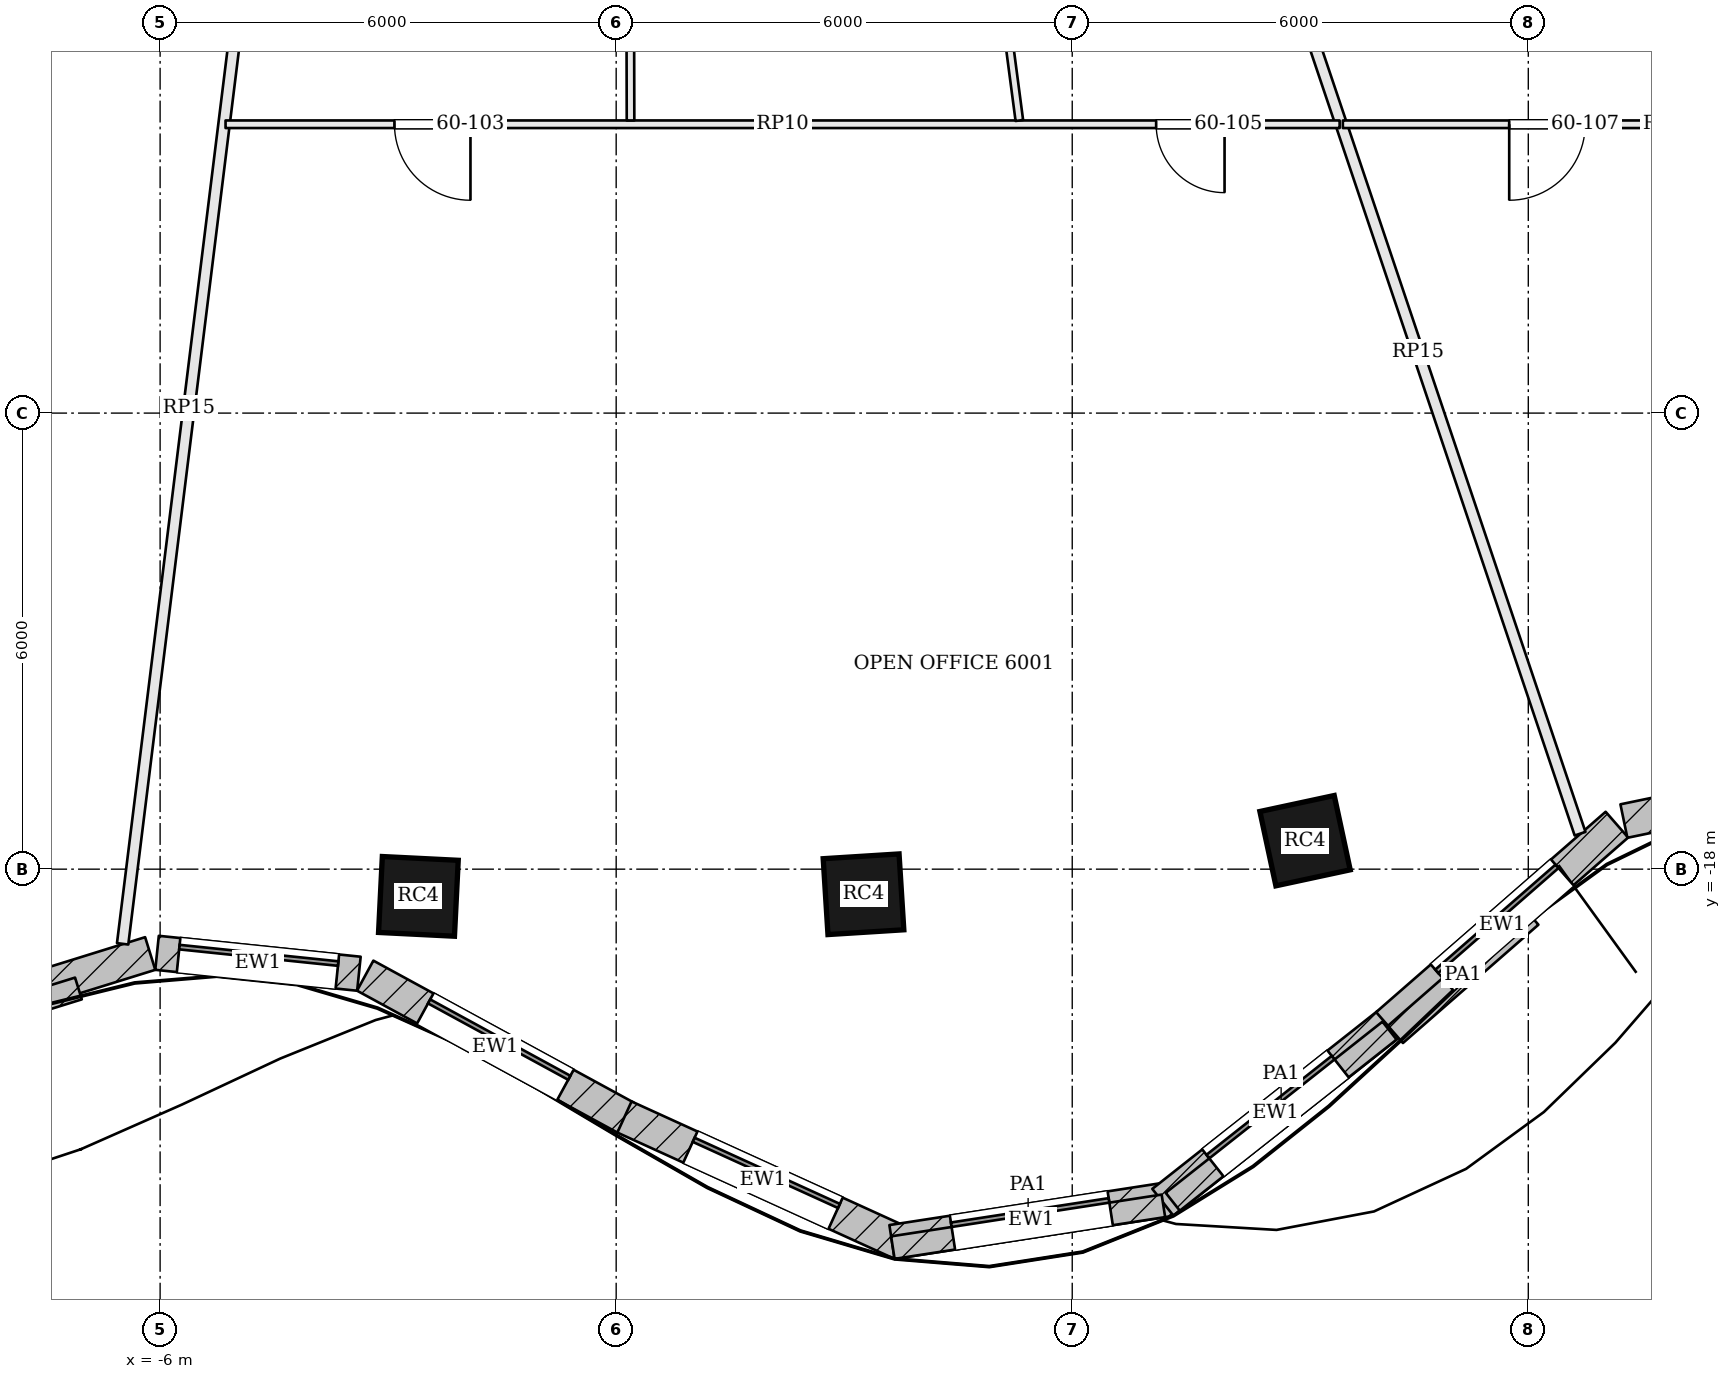
"""IFC4 building model, lengths in metres.
Left out: names, types, materials, properties, quantities, classifications, styles, units other than length and angle.
Written with IfcOpenShell. Run it as: python <this file> out.ifc"""

import sys

from ifc_helpers import new_model, si_unit, direction, frame, frame_2d, origin, origin_2d, place, context, subcontext, project, spatial, rectangle, extrude, element, fill, save


model = new_model("IFC4")
c1 = context("Model", 3, precision=1e-05, world=origin(), true_north=direction((0.0, 1.0)))
c2 = subcontext(c1, "Body", "Model", "MODEL_VIEW")
j1 = project(units=[si_unit("LENGTHUNIT", "METRE"), si_unit("PLANEANGLEUNIT", "RADIAN")], contexts=[c1])
p1 = place(None, origin())
s1 = spatial("IfcSite", under=j1, at=p1, CompositionType="ELEMENT")
p2 = place(p1, origin())
s2 = spatial("IfcBuilding", under=s1, at=p2, CompositionType="ELEMENT")
p3 = place(p2, frame((0.0, 0.0, 244.8)))
s3 = spatial("IfcBuildingStorey", under=s2, at=p3, CompositionType="ELEMENT", Elevation=244.8)
for number, where, z_axis, x_axis in (
    (1, (-2.602, -18.358, 0.0), (0.0, 0.0, 1.0), (0.999, -0.05, 0.0)),
    (2, (3.254, -18.33, 0.0), (0.0, 0.0, 1.0), (0.998, 0.063, 0.0)),
    (3, (9.063, -17.625, 0.0), (0.0, 0.0, 1.0), (0.978, 0.21, 0.0)),
):
    element("IfcColumn", number, at=place(p3, frame(where, z_axis=z_axis, x_axis=x_axis)), inside=s3, PredefinedType="COLUMN", context=c2, shape_type="SweptSolid", body=[
        extrude(rectangle(XDim=1.0, YDim=1.0, at=origin_2d()), origin(), (0.0, 0.0, 1.0), 3.9),
    ])
p4 = place(p3, frame((-11.007, -20.625, 0.0), z_axis=(0.0, 0.0, 1.0), x_axis=(0.954949254112, 0.296769139352, 0.0)))
e4 = element("IfcWall", 4, at=p4, inside=s3, PredefinedType="SOLIDWALL", context=c2, shape_type="SweptSolid", body=[
    extrude(rectangle(XDim=5.106, YDim=0.45, at=frame_2d((2.553, 0.0))), origin(), (0.0, 0.0, 1.0), 3.7),
])
p5 = place(p4, frame((1.503, 0.0, 0.9)))
e5 = element("IfcOpeningElement", 5, at=p5, cuts=e4, PredefinedType="OPENING", context=c2, shape_type="SweptSolid", body=[
    extrude(rectangle(XDim=2.1, YDim=2.3, at=frame_2d((1.05, 1.15))), frame((0.0, 0.235, 0.0), z_axis=(0.0, -1.0, 0.0), x_axis=(1.0, 0.0, 0.0)), (0.0, 0.0, 1.0), 0.47),
])
p6 = place(p3, frame((-6.04, -19.101, 0.0), z_axis=(0.0, 0.0, 1.0), x_axis=(0.994675968472, -0.103052014752, 0.0)))
e6 = element("IfcWall", 6, at=p6, inside=s3, PredefinedType="SOLIDWALL", context=c2, shape_type="SweptSolid", body=[
    extrude(rectangle(XDim=2.67, YDim=0.45, at=frame_2d((1.335, 0.0))), origin(), (0.0, 0.0, 1.0), 3.7),
])
p7 = place(p6, frame((0.285, 0.0, 0.9)))
e7 = element("IfcOpeningElement", 7, at=p7, cuts=e6, PredefinedType="OPENING", context=c2, shape_type="SweptSolid", body=[
    extrude(rectangle(XDim=2.1, YDim=2.3, at=frame_2d((1.05, 1.15))), frame((0.0, 0.235, 0.0), z_axis=(0.0, -1.0, 0.0), x_axis=(1.0, 0.0, 0.0)), (0.0, 0.0, 1.0), 0.47),
])
p8 = place(p3, frame((-3.302, -19.401, 0.0), z_axis=(0.0, 0.0, 1.0), x_axis=(0.878060540763, -0.47854956562, 0.0)))
e8 = element("IfcWall", 8, at=p8, inside=s3, PredefinedType="SOLIDWALL", context=c2, shape_type="SweptSolid", body=[
    extrude(rectangle(XDim=3.901, YDim=0.45, at=frame_2d((1.951, 0.0))), origin(), (0.0, 0.0, 1.0), 3.7),
])
p9 = place(p8, frame((0.901, 0.0, 0.9)))
e9 = element("IfcOpeningElement", 9, at=p9, cuts=e8, PredefinedType="OPENING", context=c2, shape_type="SweptSolid", body=[
    extrude(rectangle(XDim=2.1, YDim=2.3, at=frame_2d((1.05, 1.15))), frame((0.0, 0.235, 0.0), z_axis=(0.0, -1.0, 0.0), x_axis=(1.0, 0.0, 0.0)), (0.0, 0.0, 1.0), 0.47),
])
p10 = place(p3, frame((0.109, -21.261, 0.0), z_axis=(0.0, 0.0, 1.0), x_axis=(0.910040573706, -0.414519184367, 0.0)))
e10 = element("IfcWall", 10, at=p10, inside=s3, PredefinedType="SOLIDWALL", context=c2, shape_type="SweptSolid", body=[
    extrude(rectangle(XDim=4.006, YDim=0.45, at=frame_2d((2.003, 0.0))), origin(), (0.0, 0.0, 1.0), 3.7),
])
p11 = place(p10, frame((0.953, 0.0, 0.9)))
e11 = element("IfcOpeningElement", 11, at=p11, cuts=e10, PredefinedType="OPENING", context=c2, shape_type="SweptSolid", body=[
    extrude(rectangle(XDim=2.1, YDim=2.3, at=frame_2d((1.05, 1.15))), frame((0.0, 0.235, 0.0), z_axis=(0.0, -1.0, 0.0), x_axis=(1.0, 0.0, 0.0)), (0.0, 0.0, 1.0), 0.47),
])
p12 = place(p3, frame((3.629, -22.905, 0.0), z_axis=(0.0, 0.0, 1.0), x_axis=(0.988300084321, 0.152521943772, 0.0)))
e12 = element("IfcWall", 12, at=p12, inside=s3, PredefinedType="SOLIDWALL", context=c2, shape_type="SweptSolid", body=[
    extrude(rectangle(XDim=3.71, YDim=0.45, at=frame_2d((1.855, 0.0))), origin(), (0.0, 0.0, 1.0), 3.7),
])
p13 = place(p12, frame((0.805, 0.0, 0.9)))
e13 = element("IfcOpeningElement", 13, at=p13, cuts=e12, PredefinedType="OPENING", context=c2, shape_type="SweptSolid", body=[
    extrude(rectangle(XDim=2.1, YDim=2.3, at=frame_2d((1.05, 1.15))), frame((0.0, 0.235, 0.0), z_axis=(0.0, -1.0, 0.0), x_axis=(1.0, 0.0, 0.0)), (0.0, 0.0, 1.0), 0.47),
])
p14 = place(p3, frame((7.193, -22.383, 0.0), z_axis=(0.0, 0.0, 1.0), x_axis=(0.784803291184, 0.619744942816, 0.0)))
e14 = element("IfcWall", 14, at=p14, inside=s3, PredefinedType="SOLIDWALL", context=c2, shape_type="SweptSolid", body=[
    extrude(rectangle(XDim=3.775, YDim=0.45, at=frame_2d((1.887, 0.0))), origin(), (0.0, 0.0, 1.0), 3.7),
])
p15 = place(p14, frame((0.837, 0.0, 0.9)))
e15 = element("IfcOpeningElement", 15, at=p15, cuts=e14, PredefinedType="OPENING", context=c2, shape_type="SweptSolid", body=[
    extrude(rectangle(XDim=2.1, YDim=2.3, at=frame_2d((1.05, 1.15))), frame((0.0, 0.235, 0.0), z_axis=(0.0, -1.0, 0.0), x_axis=(1.0, 0.0, 0.0)), (0.0, 0.0, 1.0), 0.47),
])
p16 = place(p3, frame((10.146, -20.051, 0.0), z_axis=(0.0, 0.0, 1.0), x_axis=(0.753278140428, 0.657702093013, 0.0)))
e16 = element("IfcWall", 16, at=p16, inside=s3, PredefinedType="SOLIDWALL", context=c2, shape_type="SweptSolid", body=[
    extrude(rectangle(XDim=4.008, YDim=0.45, at=frame_2d((2.004, 0.0))), origin(), (0.0, 0.0, 1.0), 3.7),
])
p17 = place(p16, frame((0.954, 0.0, 0.9)))
e17 = element("IfcOpeningElement", 17, at=p17, cuts=e16, PredefinedType="OPENING", context=c2, shape_type="SweptSolid", body=[
    extrude(rectangle(XDim=2.1, YDim=2.3, at=frame_2d((1.05, 1.15))), frame((0.0, 0.235, 0.0), z_axis=(0.0, -1.0, 0.0), x_axis=(1.0, 0.0, 0.0)), (0.0, 0.0, 1.0), 0.47),
])
p18 = place(p3, frame((13.258, -17.367, 0.0), z_axis=(0.0, 0.0, 1.0), x_axis=(0.97914968674, 0.203140077183, 0.0)))
e18 = element("IfcWall", 18, at=p18, inside=s3, PredefinedType="SOLIDWALL", context=c2, shape_type="SweptSolid", body=[
    extrude(rectangle(XDim=3.7, YDim=0.45, at=frame_2d((1.85, 0.0))), origin(), (0.0, 0.0, 1.0), 3.7),
])
p19 = place(p18, frame((0.8, 0.0, 0.9)))
e19 = element("IfcOpeningElement", 19, at=p19, cuts=e18, PredefinedType="OPENING", context=c2, shape_type="SweptSolid", body=[
    extrude(rectangle(XDim=2.1, YDim=2.3, at=frame_2d((1.05, 1.15))), frame((0.0, 0.235, 0.0), z_axis=(0.0, -1.0, 0.0), x_axis=(1.0, 0.0, 0.0)), (0.0, 0.0, 1.0), 0.47),
])
p20 = place(p3, frame((-10.59, -20.662, 3.9), z_axis=(0.0, 0.0, 1.0), x_axis=(0.954933257017, 0.296820610207, 0.0)))
e20 = element("IfcWall", 20, at=p20, inside=s3, PredefinedType="PARAPET", context=c2, shape_type="SweptSolid", body=[
    extrude(rectangle(XDim=3.681, YDim=0.3, at=frame_2d((1.84, 0.0))), origin(), (0.0, 0.0, 1.0), 1.1),
])
p21 = place(p3, frame((3.64, -22.979, 3.9), z_axis=(0.0, 0.0, 1.0), x_axis=(0.988299486994, 0.152525814235, 0.0)))
e21 = element("IfcWall", 21, at=p21, inside=s3, PredefinedType="PARAPET", context=c2, shape_type="SweptSolid", body=[
    extrude(rectangle(XDim=3.602, YDim=0.3, at=frame_2d((1.801, 0.0))), origin(), (0.0, 0.0, 1.0), 1.1),
])
p22 = place(p3, frame((7.323, -22.376, 3.9), z_axis=(0.0, 0.0, 1.0), x_axis=(0.784819122577, 0.61972489448, 0.0)))
e22 = element("IfcWall", 22, at=p22, inside=s3, PredefinedType="PARAPET", context=c2, shape_type="SweptSolid", body=[
    extrude(rectangle(XDim=3.633, YDim=0.3, at=frame_2d((1.817, 0.0))), origin(), (0.0, 0.0, 1.0), 1.1),
])
p23 = place(p3, frame((10.252, -20.174, 3.9), z_axis=(0.0, 0.0, 1.0), x_axis=(0.753260147018, 0.657722700622, 0.0)))
e23 = element("IfcWall", 23, at=p23, inside=s3, PredefinedType="PARAPET", context=c2, shape_type="SweptSolid", body=[
    extrude(rectangle(XDim=2.366, YDim=0.3, at=frame_2d((1.183, 0.0))), origin(), (0.0, 0.0, 1.0), 1.1),
])
p24 = place(p3, frame((-6.493, -18.982, 0.0), z_axis=(0.0, 0.0, 1.0), x_axis=(0.122779061943, 0.992434029016, 0.0)))
e24 = element("IfcWall", 24, at=p24, inside=s3, PredefinedType="PARTITIONING", context=c2, shape_type="SweptSolid", body=[
    extrude(rectangle(XDim=14.216, YDim=0.15, at=frame_2d((7.108, 0.0))), origin(), (0.0, 0.0, 1.0), 3.084),
])
p25 = place(p3, frame((12.681, -17.533, 0.0), z_axis=(0.0, 0.0, 1.0), x_axis=(-0.319049570706, 0.947738028905, 0.0)))
e25 = element("IfcWall", 25, at=p25, inside=s3, PredefinedType="PARTITIONING", context=c2, shape_type="SweptSolid", body=[
    extrude(rectangle(XDim=13.361, YDim=0.15, at=frame_2d((6.68, 0.0))), origin(), (0.0, 0.0, 1.0), 3.084),
])
p26 = place(p3, frame((9.518, -8.2, 0.0), z_axis=(0.0, 0.0, 1.0), x_axis=(-1.0, 0.0, 0.0)))
e26 = element("IfcWall", 26, at=p26, inside=s3, PredefinedType="PARTITIONING", context=c2, shape_type="SweptSolid", body=[
    extrude(rectangle(XDim=14.657, YDim=0.1, at=frame_2d((7.329, 0.0))), origin(), (0.0, 0.0, 1.0), 3.084),
])
p27 = place(p26, frame((11.435, 0.0, 0.0)))
e27 = element("IfcOpeningElement", 27, at=p27, cuts=e26, PredefinedType="OPENING", context=c2, shape_type="SweptSolid", body=[
    extrude(rectangle(XDim=1.0, YDim=2.1, at=frame_2d((0.5, 1.05))), frame((0.0, 0.06, 0.0), z_axis=(0.0, -1.0, 0.0), x_axis=(1.0, 0.0, 0.0)), (0.0, 0.0, 1.0), 0.12),
])
p28 = place(p26, frame((1.514, 0.0, 0.0)))
e28 = element("IfcOpeningElement", 28, at=p28, cuts=e26, PredefinedType="OPENING", context=c2, shape_type="SweptSolid", body=[
    extrude(rectangle(XDim=0.9, YDim=2.1, at=frame_2d((0.45, 1.05))), frame((0.0, 0.06, 0.0), z_axis=(0.0, -1.0, 0.0), x_axis=(1.0, 0.0, 0.0)), (0.0, 0.0, 1.0), 0.12),
])
p29 = place(p3, frame((0.181, -4.875, 0.0), z_axis=(0.0, 0.0, 1.0), x_axis=(0.002311012168, -0.999997329608, 0.0)))
e29 = element("IfcWall", 29, at=p29, inside=s3, PredefinedType="PARTITIONING", context=c2, shape_type="SweptSolid", body=[
    extrude(rectangle(XDim=3.275, YDim=0.1, at=frame_2d((1.637, 0.0))), origin(), (0.0, 0.0, 1.0), 3.084),
])
p30 = place(p3, frame((4.873, -4.875, 0.0), z_axis=(0.0, 0.0, 1.0), x_axis=(0.13048891715, -0.991449768017, 0.0)))
e30 = element("IfcWall", 30, at=p30, inside=s3, PredefinedType="PARTITIONING", context=c2, shape_type="SweptSolid", body=[
    extrude(rectangle(XDim=3.304, YDim=0.1, at=frame_2d((1.652, 0.0))), origin(), (0.0, 0.0, 1.0), 3.084),
])
p31 = place(p3, frame((18.15, -8.2, 0.0), z_axis=(0.0, 0.0, 1.0), x_axis=(-1.0, 0.0, 0.0)))
e31 = element("IfcWall", 31, at=p31, inside=s3, PredefinedType="PARTITIONING", context=c2, shape_type="SweptSolid", body=[
    extrude(rectangle(XDim=8.59, YDim=0.1, at=frame_2d((4.295, 0.0))), origin(), (0.0, 0.0, 1.0), 3.084),
])
p32 = place(p31, frame((5.401, 0.0, 0.0)))
e32 = element("IfcOpeningElement", 32, at=p32, cuts=e31, PredefinedType="OPENING", context=c2, shape_type="SweptSolid", body=[
    extrude(rectangle(XDim=1.0, YDim=2.1, at=frame_2d((0.5, 1.05))), frame((0.0, 0.06, 0.0), z_axis=(0.0, -1.0, 0.0), x_axis=(1.0, 0.0, 0.0)), (0.0, 0.0, 1.0), 0.12),
])
p33 = place(p3, frame((12.495, -4.856, 0.0), z_axis=(0.0, 0.0, 1.0), x_axis=(0.663152041806, -0.748484715574, 0.0)))
e33 = element("IfcWall", 33, at=p33, inside=s3, PredefinedType="PARTITIONING", context=c2, shape_type="SweptSolid", body=[
    extrude(rectangle(XDim=4.417, YDim=0.1, at=frame_2d((2.209, 0.0))), origin(), (0.0, 0.0, 1.0), 3.084),
])
p34 = place(p7, origin())
e34 = element("IfcWindow", 34, at=p34, inside=s3, PartitioningType="SINGLE_PANEL", PredefinedType="WINDOW", context=c2, shape_type="SweptSolid", body=[
    extrude(rectangle(XDim=2.1, YDim=2.3, at=frame_2d((1.05, 1.15))), frame((0.0, 0.135, 0.0), z_axis=(0.0, -1.0, 0.0), x_axis=(1.0, 0.0, 0.0)), (0.0, 0.0, 1.0), 0.06),
])
fill(e7, e34)
p35 = place(p9, origin())
e35 = element("IfcWindow", 35, at=p35, inside=s3, PartitioningType="SINGLE_PANEL", PredefinedType="WINDOW", context=c2, shape_type="SweptSolid", body=[
    extrude(rectangle(XDim=2.1, YDim=2.3, at=frame_2d((1.05, 1.15))), frame((0.0, 0.135, 0.0), z_axis=(0.0, -1.0, 0.0), x_axis=(1.0, 0.0, 0.0)), (0.0, 0.0, 1.0), 0.06),
])
fill(e9, e35)
p36 = place(p11, origin())
e36 = element("IfcWindow", 36, at=p36, inside=s3, PartitioningType="SINGLE_PANEL", PredefinedType="WINDOW", context=c2, shape_type="SweptSolid", body=[
    extrude(rectangle(XDim=2.1, YDim=2.3, at=frame_2d((1.05, 1.15))), frame((0.0, 0.135, 0.0), z_axis=(0.0, -1.0, 0.0), x_axis=(1.0, 0.0, 0.0)), (0.0, 0.0, 1.0), 0.06),
])
fill(e11, e36)
p37 = place(p13, origin())
e37 = element("IfcWindow", 37, at=p37, inside=s3, PartitioningType="SINGLE_PANEL", PredefinedType="WINDOW", context=c2, shape_type="SweptSolid", body=[
    extrude(rectangle(XDim=2.1, YDim=2.3, at=frame_2d((1.05, 1.15))), frame((0.0, 0.135, 0.0), z_axis=(0.0, -1.0, 0.0), x_axis=(1.0, 0.0, 0.0)), (0.0, 0.0, 1.0), 0.06),
])
fill(e13, e37)
p38 = place(p15, origin())
e38 = element("IfcWindow", 38, at=p38, inside=s3, PartitioningType="SINGLE_PANEL", PredefinedType="WINDOW", context=c2, shape_type="SweptSolid", body=[
    extrude(rectangle(XDim=2.1, YDim=2.3, at=frame_2d((1.05, 1.15))), frame((0.0, 0.135, 0.0), z_axis=(0.0, -1.0, 0.0), x_axis=(1.0, 0.0, 0.0)), (0.0, 0.0, 1.0), 0.06),
])
fill(e15, e38)
p39 = place(p17, origin())
e39 = element("IfcWindow", 39, at=p39, inside=s3, PartitioningType="SINGLE_PANEL", PredefinedType="WINDOW", context=c2, shape_type="SweptSolid", body=[
    extrude(rectangle(XDim=2.1, YDim=2.3, at=frame_2d((1.05, 1.15))), frame((0.0, 0.135, 0.0), z_axis=(0.0, -1.0, 0.0), x_axis=(1.0, 0.0, 0.0)), (0.0, 0.0, 1.0), 0.06),
])
fill(e17, e39)
p40 = place(p27, origin())
e40 = element("IfcDoor", 40, at=p40, inside=s3, OperationType="SINGLE_SWING_LEFT", PredefinedType="DOOR", context=c2, shape_type="SweptSolid", body=[
    extrude(rectangle(XDim=1.0, YDim=2.1, at=frame_2d((0.5, 1.05))), frame((0.0, 0.025, 0.0), z_axis=(0.0, -1.0, 0.0), x_axis=(1.0, 0.0, 0.0)), (0.0, 0.0, 1.0), 0.05),
])
fill(e27, e40)
p41 = place(p28, origin())
e41 = element("IfcDoor", 41, at=p41, inside=s3, OperationType="SINGLE_SWING_LEFT", PredefinedType="DOOR", context=c2, shape_type="SweptSolid", body=[
    extrude(rectangle(XDim=0.9, YDim=2.1, at=frame_2d((0.45, 1.05))), frame((0.0, 0.025, 0.0), z_axis=(0.0, -1.0, 0.0), x_axis=(1.0, 0.0, 0.0)), (0.0, 0.0, 1.0), 0.05),
])
fill(e28, e41)
p42 = place(p32, origin())
e42 = element("IfcDoor", 42, at=p42, inside=s3, OperationType="SINGLE_SWING_RIGHT", PredefinedType="DOOR", context=c2, shape_type="SweptSolid", body=[
    extrude(rectangle(XDim=1.0, YDim=2.1, at=frame_2d((0.5, 1.05))), frame((0.0, 0.025, 0.0), z_axis=(0.0, -1.0, 0.0), x_axis=(1.0, 0.0, 0.0)), (0.0, 0.0, 1.0), 0.05),
])
fill(e32, e42)
save(model, sys.argv[1])
